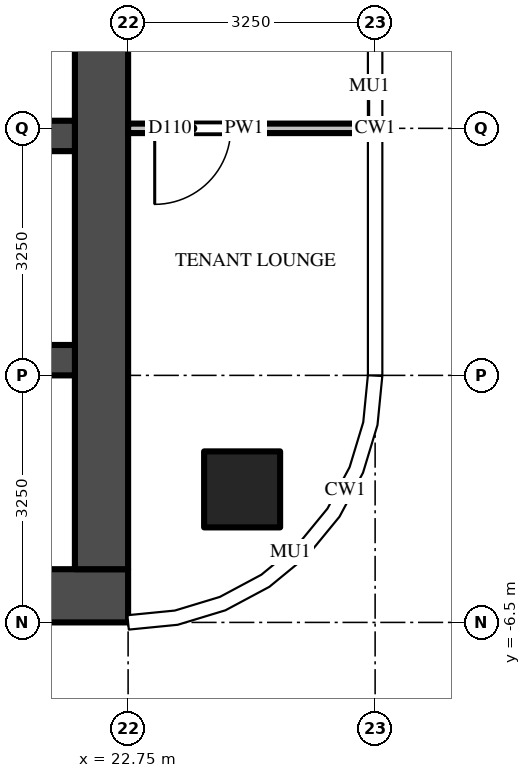
"""IFC4 building model, lengths in metres.
Left out: names, types, materials, properties, quantities, classifications, styles, units other than length and angle.
Written with IfcOpenShell. Run it as: python <this file> out.ifc"""

import sys

from ifc_helpers import new_model, si_unit, direction, frame, frame_2d, origin, origin_2d, place, context, subcontext, project, spatial, rectangle, extrude, source, transform, mapped, element, fill, save


model = new_model("IFC4")
c1 = context("Model", 3, precision=1e-05, world=origin(), true_north=direction((0.0, 1.0)))
c2 = subcontext(c1, "Body", "Model", "MODEL_VIEW")
j1 = project(units=[si_unit("LENGTHUNIT", "METRE"), si_unit("PLANEANGLEUNIT", "RADIAN")], contexts=[c1])
p1 = place(None, origin())
s1 = spatial("IfcSite", under=j1, at=p1, CompositionType="ELEMENT")
p2 = place(p1, origin())
s2 = spatial("IfcBuilding", under=s1, at=p2, CompositionType="ELEMENT")
p3 = place(p2, frame((0.0, 0.0, 306.7)))
s3 = spatial("IfcBuildingStorey", under=s2, at=p3, CompositionType="ELEMENT", Elevation=306.7)
m1 = source(origin(), c2, "Body", "SweptSolid", [
    extrude(rectangle(XDim=1.0, YDim=1.0, at=origin_2d()), origin(), (0.0, 0.0, 1.0), 3.9),
])
p4 = place(p3, frame((24.25, -4.75, 0.0), z_axis=(0.0, 0.0, 1.0), x_axis=(1.0, 0.0, 0.0)))
e1 = element("IfcColumn", 1, at=p4, inside=s3, PredefinedType="COLUMN", context=c2, shape_type="MappedRepresentation", body=[
    mapped(m1, transform((0.0, 0.0, 0.0))),
])
m2 = source(origin(), c2, "Body", "SweptSolid", [
    extrude(rectangle(XDim=16.65, YDim=0.7, at=frame_2d((8.325, 0.0))), origin(), (0.0, 0.0, 1.0), 3.7),
])
p5 = place(p3, frame((6.1, -6.15, 0.0), z_axis=(0.0, 0.0, 1.0), x_axis=(1.0, 0.0, 0.0)))
e2 = element("IfcWall", 2, at=p5, inside=s3, PredefinedType="SHEAR", context=c2, shape_type="MappedRepresentation", body=[
    mapped(m2, transform((0.0, 0.0, 0.0))),
])
m3 = source(origin(), c2, "Body", "SweptSolid", [
    extrude(rectangle(XDim=9.05, YDim=0.7, at=frame_2d((4.525, 0.0))), origin(), (0.0, 0.0, 1.0), 3.7),
])
p6 = place(p3, frame((22.4, -5.8, 0.0), z_axis=(0.0, 0.0, 1.0), x_axis=(0.0, 1.0, 0.0)))
e3 = element("IfcWall", 3, at=p6, inside=s3, PredefinedType="SHEAR", context=c2, shape_type="MappedRepresentation", body=[
    mapped(m3, transform((0.0, 0.0, 0.0))),
])
m4 = source(origin(), c2, "Body", "SweptSolid", [
    extrude(rectangle(XDim=14.85, YDim=0.4, at=frame_2d((7.425, 0.0))), origin(), (0.0, 0.0, 1.0), 3.7),
])
p7 = place(p3, frame((7.2, -0.1, 0.0), z_axis=(0.0, 0.0, 1.0), x_axis=(1.0, 0.0, 0.0)))
e4 = element("IfcWall", 4, at=p7, inside=s3, PredefinedType="SHEAR", context=c2, shape_type="MappedRepresentation", body=[
    mapped(m4, transform((0.0, 0.0, 0.0))),
])
m5 = source(origin(), c2, "Body", "SweptSolid", [
    extrude(rectangle(XDim=1.0, YDim=2.1, at=frame_2d((0.5, 1.05))), frame((0.0, 0.21, 0.0), z_axis=(0.0, -1.0, 0.0), x_axis=(1.0, 0.0, 0.0)), (0.0, 0.0, 1.0), 0.42),
])
p8 = place(p7, frame((7.9, 0.0, 0.0)))
e5 = element("IfcOpeningElement", 5, at=p8, cuts=e4, PredefinedType="OPENING", context=c2, shape_type="MappedRepresentation", body=[
    mapped(m5, transform((0.0, 0.0, 0.0))),
])
m6 = source(origin(), c2, "Body", "SweptSolid", [
    extrude(rectangle(XDim=5.7, YDim=0.4, at=frame_2d((2.85, 0.0))), origin(), (0.0, 0.0, 1.0), 3.7),
])
p9 = place(p3, frame((16.35, -3.05, 0.0), z_axis=(0.0, 0.0, 1.0), x_axis=(1.0, 0.0, 0.0)))
e6 = element("IfcWall", 6, at=p9, inside=s3, PredefinedType="SHEAR", context=c2, shape_type="MappedRepresentation", body=[
    mapped(m6, transform((0.0, 0.0, 0.0))),
])
m7 = source(origin(), c2, "Body", "SweptSolid", [
    extrude(rectangle(XDim=3.05, YDim=0.125, at=frame_2d((1.525, 0.0))), origin(), (0.0, 0.0, 1.0), 2.78),
])
p10 = place(p3, frame((25.8, 0.0, 0.0), z_axis=(0.0, 0.0, 1.0), x_axis=(-1.0, 0.0, 0.0)))
e7 = element("IfcWall", 7, at=p10, inside=s3, PredefinedType="PARTITIONING", context=c2, shape_type="MappedRepresentation", body=[
    mapped(m7, transform((0.0, 0.0, 0.0))),
])
m8 = source(origin(), c2, "Body", "SweptSolid", [
    extrude(rectangle(XDim=1.0, YDim=2.1, at=frame_2d((0.5, 1.05))), frame((0.0, 0.073, 0.0), z_axis=(0.0, -1.0, 0.0), x_axis=(1.0, 0.0, 0.0)), (0.0, 0.0, 1.0), 0.145),
])
p11 = place(p10, frame((1.7, 0.0, 0.0)))
e8 = element("IfcOpeningElement", 8, at=p11, cuts=e7, PredefinedType="OPENING", context=c2, shape_type="MappedRepresentation", body=[
    mapped(m8, transform((0.0, 0.0, 0.0))),
])
m9 = source(origin(), c2, "Body", "SweptSolid", [
    extrude(rectangle(XDim=1.0, YDim=2.1, at=frame_2d((0.5, 1.05))), frame((0.0, 0.025, 0.0), z_axis=(0.0, -1.0, 0.0), x_axis=(1.0, 0.0, 0.0)), (0.0, 0.0, 1.0), 0.05),
])
p12 = place(p11, origin())
e9 = element("IfcDoor", 9, at=p12, inside=s3, OperationType="SINGLE_SWING_RIGHT", PredefinedType="DOOR", context=c2, shape_type="MappedRepresentation", body=[
    mapped(m9, transform((0.0, 0.0, 0.0))),
])
fill(e8, e9)
save(model, sys.argv[1])
